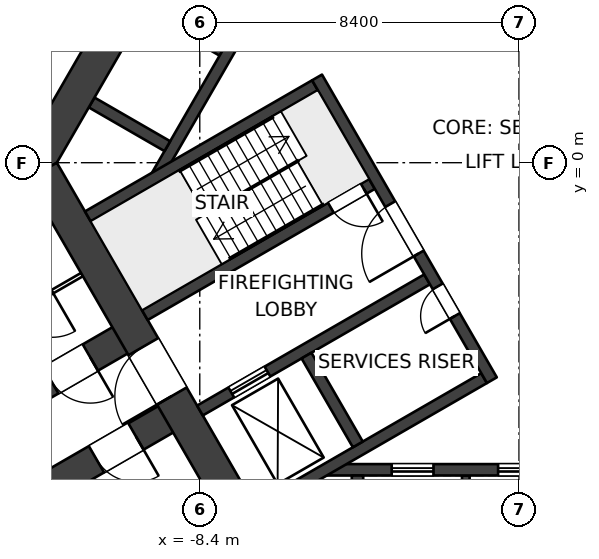
"""IFC4 building model, lengths in metres.
Left out: names, types, materials, properties, quantities, classifications, styles, units other than length and angle.
Written with IfcOpenShell. Run it as: python <this file> out.ifc"""

import sys

from ifc_helpers import new_model, si_unit, direction, frame, frame_2d, origin, place, context, subcontext, project, spatial, polyline, rectangle, outline, extrude, element, fill, save


model = new_model("IFC4")
c1 = context("Model", 3, precision=1e-05, world=origin(), true_north=direction((0.0, 1.0)))
c2 = subcontext(c1, "Body", "Model", "MODEL_VIEW")
j1 = project(units=[si_unit("LENGTHUNIT", "METRE"), si_unit("PLANEANGLEUNIT", "RADIAN")], contexts=[c1])
p1 = place(None, origin())
s1 = spatial("IfcSite", under=j1, at=p1, CompositionType="ELEMENT")
p2 = place(p1, origin())
s2 = spatial("IfcBuilding", under=s1, at=p2, CompositionType="ELEMENT")
p3 = place(p2, frame((0.0, 0.0, -3.5)))
s3 = spatial("IfcBuildingStorey", under=s2, at=p3, CompositionType="ELEMENT", Elevation=-3.5)
p4 = place(p3, frame((-6.47, -10.757, 0.0), z_axis=(0.0, 0.0, 1.0), x_axis=(-0.499997612506, 0.8660267822, 0.0)))
e1 = element("IfcWall", 1, at=p4, inside=s3, PredefinedType="SHEAR", context=c2, shape_type="SweptSolid", body=[
    extrude(rectangle(XDim=12.161, YDim=0.9, at=frame_2d((6.08, 0.0))), origin(), (0.0, 0.0, 1.0), 3.5),
])
p5 = place(p4, frame((5.33, 0.0, 0.0)))
e2 = element("IfcOpeningElement", 2, at=p5, cuts=e1, PredefinedType="OPENING", context=c2, shape_type="SweptSolid", body=[
    extrude(rectangle(XDim=1.5, YDim=2.1, at=frame_2d((0.75, 1.05))), frame((0.0, 0.46, 0.0), z_axis=(0.0, -1.0, 0.0), x_axis=(1.0, 0.0, 0.0)), (0.0, 0.0, 1.0), 0.92),
])
p6 = place(p3, origin())
e3 = element("IfcWall", 3, at=p6, inside=s3, PredefinedType="SHEAR", context=c2, shape_type="SweptSolid", body=[
    extrude(outline(polyline([(-6.6, 11.432), (-13.2, 0.0), (-12.94, -0.45), (-12.161, 0.0), (-6.08, 10.531), (-6.08, 11.432), (-6.6, 11.432)])), origin(), (0.0, 0.0, 1.0), 3.5),
])
p7 = place(p3, frame((-0.714, -5.724, 0.0), z_axis=(0.0, 0.0, 1.0), x_axis=(-0.499995050369, 0.866028261437, 0.0)))
e4 = element("IfcWall", 4, at=p7, inside=s3, PredefinedType="SHEAR", context=c2, shape_type="SweptSolid", body=[
    extrude(rectangle(XDim=9.2, YDim=0.3, at=frame_2d((4.6, 0.0))), origin(), (0.0, 0.0, 1.0), 3.5),
])
p8 = place(p7, frame((3.85, 0.0, 0.0)))
e5 = element("IfcOpeningElement", 5, at=p8, cuts=e4, PredefinedType="OPENING", context=c2, shape_type="SweptSolid", body=[
    extrude(rectangle(XDim=1.5, YDim=2.1, at=frame_2d((0.75, 1.05))), frame((0.0, 0.16, 0.0), z_axis=(0.0, -1.0, 0.0), x_axis=(1.0, 0.0, 0.0)), (0.0, 0.0, 1.0), 0.32),
])
p9 = place(p7, frame((1.95, 0.0, 0.0)))
e6 = element("IfcOpeningElement", 6, at=p9, cuts=e4, PredefinedType="OPENING", context=c2, shape_type="SweptSolid", body=[
    extrude(rectangle(XDim=0.9, YDim=2.1, at=frame_2d((0.45, 1.05))), frame((0.0, 0.16, 0.0), z_axis=(0.0, -1.0, 0.0), x_axis=(1.0, 0.0, 0.0)), (0.0, 0.0, 1.0), 0.32),
])
p10 = place(p3, frame((-3.869, -0.559, 0.0), z_axis=(0.0, 0.0, 1.0), x_axis=(-0.86602711848, -0.499997030048, 0.0)))
e7 = element("IfcWall", 7, at=p10, inside=s3, PredefinedType="SHEAR", context=c2, shape_type="SweptSolid", body=[
    extrude(rectangle(XDim=6.901, YDim=0.3, at=frame_2d((3.451, 0.0))), origin(), (0.0, 0.0, 1.0), 3.5),
])
p11 = place(p10, frame((0.25, 0.0, 0.0)))
e8 = element("IfcOpeningElement", 8, at=p11, cuts=e7, PredefinedType="OPENING", context=c2, shape_type="SweptSolid", body=[
    extrude(rectangle(XDim=1.0, YDim=2.1, at=frame_2d((0.5, 1.05))), frame((0.0, 0.16, 0.0), z_axis=(0.0, -1.0, 0.0), x_axis=(1.0, 0.0, 0.0)), (0.0, 0.0, 1.0), 0.32),
])
p12 = place(p3, frame((-5.369, 2.039, 0.0), z_axis=(0.0, 0.0, 1.0), x_axis=(-0.86602711848, -0.499997030048, 0.0)))
e9 = element("IfcWall", 9, at=p12, inside=s3, PredefinedType="SHEAR", context=c2, shape_type="SweptSolid", body=[
    extrude(rectangle(XDim=6.901, YDim=0.3, at=frame_2d((3.451, 0.0))), origin(), (0.0, 0.0, 1.0), 3.5),
])
p13 = place(p3, frame((-2.419, -3.071, 0.0), z_axis=(0.0, 0.0, 1.0), x_axis=(-0.86602711848, -0.499997030048, 0.0)))
e10 = element("IfcWall", 10, at=p13, inside=s3, PredefinedType="SHEAR", context=c2, shape_type="SweptSolid", body=[
    extrude(rectangle(XDim=6.901, YDim=0.3, at=frame_2d((3.451, 0.0))), origin(), (0.0, 0.0, 1.0), 3.5),
])
p14 = place(p13, frame((4.85, 0.0, 0.0)))
e11 = element("IfcOpeningElement", 11, at=p14, cuts=e10, PredefinedType="OPENING", context=c2, shape_type="SweptSolid", body=[
    extrude(rectangle(XDim=1.1, YDim=2.1, at=frame_2d((0.55, 1.05))), frame((0.0, 0.16, 0.0), z_axis=(0.0, -1.0, 0.0), x_axis=(1.0, 0.0, 0.0)), (0.0, 0.0, 1.0), 0.32),
])
p15 = place(p3, frame((-0.919, -5.669, 0.0), z_axis=(0.0, 0.0, 1.0), x_axis=(-0.866011800373, -0.500023561059, 0.0)))
e12 = element("IfcWall", 12, at=p15, inside=s3, PredefinedType="SHEAR", context=c2, shape_type="SweptSolid", body=[
    extrude(rectangle(XDim=6.902, YDim=0.3, at=frame_2d((3.451, 0.0))), origin(), (0.0, 0.0, 1.0), 3.5),
])
p16 = place(p3, frame((-4.241, -7.414, 0.0), z_axis=(0.0, 0.0, 1.0), x_axis=(-0.500048589285, 0.86599734893, 0.0)))
e13 = element("IfcWall", 13, at=p16, inside=s3, PredefinedType="SHEAR", context=c2, shape_type="SweptSolid", body=[
    extrude(rectangle(XDim=2.7, YDim=0.3, at=frame_2d((1.35, 0.0))), origin(), (0.0, 0.0, 1.0), 3.5),
])
p17 = place(p3, frame((5.098, -8.082, 0.0), z_axis=(0.0, 0.0, 1.0), x_axis=(-1.0, 0.0, 0.0)))
e14 = element("IfcWall", 14, at=p17, inside=s3, PredefinedType="SHEAR", context=c2, shape_type="SweptSolid", body=[
    extrude(rectangle(XDim=10.195, YDim=0.3, at=frame_2d((5.098, 0.0))), origin(), (0.0, 0.0, 1.0), 3.5),
])
p18 = place(p17, frame((1.748, 0.0, 0.0)))
e15 = element("IfcOpeningElement", 15, at=p18, cuts=e14, PredefinedType="OPENING", context=c2, shape_type="SweptSolid", body=[
    extrude(rectangle(XDim=1.1, YDim=2.1, at=frame_2d((0.55, 1.05))), frame((0.0, 0.16, 0.0), z_axis=(0.0, -1.0, 0.0), x_axis=(1.0, 0.0, 0.0)), (0.0, 0.0, 1.0), 0.32),
])
p19 = place(p17, frame((4.548, 0.0, 0.0)))
e16 = element("IfcOpeningElement", 16, at=p19, cuts=e14, PredefinedType="OPENING", context=c2, shape_type="SweptSolid", body=[
    extrude(rectangle(XDim=1.1, YDim=2.1, at=frame_2d((0.55, 1.05))), frame((0.0, 0.16, 0.0), z_axis=(0.0, -1.0, 0.0), x_axis=(1.0, 0.0, 0.0)), (0.0, 0.0, 1.0), 0.32),
])
p20 = place(p17, frame((7.348, 0.0, 0.0)))
e17 = element("IfcOpeningElement", 17, at=p20, cuts=e14, PredefinedType="OPENING", context=c2, shape_type="SweptSolid", body=[
    extrude(rectangle(XDim=1.1, YDim=2.1, at=frame_2d((0.55, 1.05))), frame((0.0, 0.16, 0.0), z_axis=(0.0, -1.0, 0.0), x_axis=(1.0, 0.0, 0.0)), (0.0, 0.0, 1.0), 0.32),
])
p21 = place(p3, frame((-4.25, -8.231, 0.0), z_axis=(0.0, 0.0, 1.0), x_axis=(0.0, -1.0, 0.0)))
e18 = element("IfcWall", 18, at=p21, inside=s3, PredefinedType="SHEAR", context=c2, shape_type="SweptSolid", body=[
    extrude(rectangle(XDim=2.3, YDim=0.3, at=frame_2d((1.15, 0.0))), origin(), (0.0, 0.0, 1.0), 3.5),
])
p22 = place(p3, frame((-1.4, -8.231, 0.0), z_axis=(0.0, 0.0, 1.0), x_axis=(0.0, -1.0, 0.0)))
e19 = element("IfcWall", 19, at=p22, inside=s3, PredefinedType="SHEAR", context=c2, shape_type="SweptSolid", body=[
    extrude(rectangle(XDim=2.3, YDim=0.2, at=frame_2d((1.15, 0.0))), origin(), (0.0, 0.0, 1.0), 3.5),
])
p23 = place(p3, frame((-9.548, -0.374, 0.0), z_axis=(0.0, 0.0, 1.0), x_axis=(0.500002290144, 0.866024081565, 0.0)))
e20 = element("IfcWall", 20, at=p23, inside=s3, PredefinedType="SHEAR", context=c2, shape_type="SweptSolid", body=[
    extrude(rectangle(XDim=10.195, YDim=0.3, at=frame_2d((5.098, 0.0))), origin(), (0.0, 0.0, 1.0), 3.5),
])
p24 = place(p3, frame((-9.254, 0.435, 0.0), z_axis=(0.0, 0.0, 1.0), x_axis=(-0.866007057882, 0.500031774688, 0.0)))
e21 = element("IfcWall", 21, at=p24, inside=s3, PredefinedType="SHEAR", context=c2, shape_type="SweptSolid", body=[
    extrude(rectangle(XDim=2.3, YDim=0.3, at=frame_2d((1.15, 0.0))), origin(), (0.0, 0.0, 1.0), 3.5),
])
p25 = place(p3, frame((-7.829, 2.903, 0.0), z_axis=(0.0, 0.0, 1.0), x_axis=(-0.866053019151, 0.499952165731, 0.0)))
e22 = element("IfcWall", 22, at=p25, inside=s3, PredefinedType="SHEAR", context=c2, shape_type="SweptSolid", body=[
    extrude(rectangle(XDim=2.3, YDim=0.2, at=frame_2d((1.15, 0.0))), origin(), (0.0, 0.0, 1.0), 3.5),
])
p26 = place(p3, frame((-8.91, -6.53, 0.0), z_axis=(0.0, 0.0, 1.0), x_axis=(-0.866025284237, -0.500000207062, 0.0)))
e23 = element("IfcWall", 23, at=p26, inside=s3, PredefinedType="SHEAR", context=c2, shape_type="SweptSolid", body=[
    extrude(rectangle(XDim=36.75, YDim=0.8, at=frame_2d((18.375, 0.0))), origin(), (0.0, 0.0, 1.0), 3.5),
])
p27 = place(p26, frame((1.35, 0.0, 0.0)))
e24 = element("IfcOpeningElement", 24, at=p27, cuts=e23, PredefinedType="OPENING", context=c2, shape_type="SweptSolid", body=[
    extrude(rectangle(XDim=1.2, YDim=2.1, at=frame_2d((0.6, 1.05))), frame((0.0, 0.41, 0.0), z_axis=(0.0, -1.0, 0.0), x_axis=(1.0, 0.0, 0.0)), (0.0, 0.0, 1.0), 0.82),
])
p28 = place(p3, frame((-10.11, -4.451, 0.0), z_axis=(0.0, 0.0, 1.0), x_axis=(-0.866025284237, -0.500000207062, 0.0)))
e25 = element("IfcWall", 25, at=p28, inside=s3, PredefinedType="SHEAR", context=c2, shape_type="SweptSolid", body=[
    extrude(rectangle(XDim=36.75, YDim=0.8, at=frame_2d((18.375, 0.0))), origin(), (0.0, 0.0, 1.0), 3.5),
])
p29 = place(p28, frame((1.35, 0.0, 0.0)))
e26 = element("IfcOpeningElement", 26, at=p29, cuts=e25, PredefinedType="OPENING", context=c2, shape_type="SweptSolid", body=[
    extrude(rectangle(XDim=1.2, YDim=2.1, at=frame_2d((0.6, 1.05))), frame((0.0, 0.41, 0.0), z_axis=(0.0, -1.0, 0.0), x_axis=(1.0, 0.0, 0.0)), (0.0, 0.0, 1.0), 0.82),
])
p30 = place(p3, frame((-11.5, -2.945, 0.0), z_axis=(0.0, 0.0, 1.0), x_axis=(-0.866034573852, -0.49998411664, 0.0)))
e27 = element("IfcWall", 27, at=p30, inside=s3, PredefinedType="PARTITIONING", context=c2, shape_type="SweptSolid", body=[
    extrude(rectangle(XDim=2.8, YDim=0.1, at=frame_2d((1.4, 0.0))), origin(), (0.0, 0.0, 1.0), 3.15),
])
p31 = place(p30, frame((0.9, 0.0, 0.0)))
e28 = element("IfcOpeningElement", 28, at=p31, cuts=e27, PredefinedType="OPENING", context=c2, shape_type="SweptSolid", body=[
    extrude(rectangle(XDim=1.2, YDim=2.1, at=frame_2d((0.6, 1.05))), frame((0.0, 0.06, 0.0), z_axis=(0.0, -1.0, 0.0), x_axis=(1.0, 0.0, 0.0)), (0.0, 0.0, 1.0), 0.12),
])
p32 = place(p3, frame((-9.45, 6.495, 0.0), z_axis=(0.0, 0.0, 1.0), x_axis=(-0.866025301493, -0.500000177174, 0.0)))
e29 = element("IfcWall", 29, at=p32, inside=s3, PredefinedType="SOLIDWALL", context=c2, shape_type="SweptSolid", body=[
    extrude(rectangle(XDim=43.095, YDim=0.3, at=frame_2d((21.548, 0.0))), origin(), (0.0, 0.0, 1.0), 3.15),
])
p33 = place(p32, frame((26.595, 0.0, 0.0)))
e30 = element("IfcOpeningElement", 30, at=p33, cuts=e29, PredefinedType="OPENING", context=c2, shape_type="SweptSolid", body=[
    extrude(rectangle(XDim=1.8, YDim=2.4, at=frame_2d((0.9, 1.2))), frame((0.0, 0.16, 0.0), z_axis=(0.0, -1.0, 0.0), x_axis=(1.0, 0.0, 0.0)), (0.0, 0.0, 1.0), 0.32),
])
p34 = place(p19, origin())
e31 = element("IfcDoor", 31, at=p34, inside=s3, OperationType="DOUBLE_DOOR_SLIDING", PredefinedType="DOOR", context=c2, shape_type="SweptSolid", body=[
    extrude(rectangle(XDim=1.1, YDim=2.1, at=frame_2d((0.55, 1.05))), frame((0.0, 0.025, 0.0), z_axis=(0.0, -1.0, 0.0), x_axis=(1.0, 0.0, 0.0)), (0.0, 0.0, 1.0), 0.05),
])
fill(e16, e31)
p35 = place(p20, origin())
e32 = element("IfcDoor", 32, at=p35, inside=s3, OperationType="DOUBLE_DOOR_SLIDING", PredefinedType="DOOR", context=c2, shape_type="SweptSolid", body=[
    extrude(rectangle(XDim=1.1, YDim=2.1, at=frame_2d((0.55, 1.05))), frame((0.0, 0.025, 0.0), z_axis=(0.0, -1.0, 0.0), x_axis=(1.0, 0.0, 0.0)), (0.0, 0.0, 1.0), 0.05),
])
fill(e17, e32)
p36 = place(p14, origin())
e33 = element("IfcDoor", 33, at=p36, inside=s3, OperationType="DOUBLE_DOOR_SLIDING", PredefinedType="DOOR", context=c2, shape_type="SweptSolid", body=[
    extrude(rectangle(XDim=1.1, YDim=2.1, at=frame_2d((0.55, 1.05))), frame((0.0, 0.025, 0.0), z_axis=(0.0, -1.0, 0.0), x_axis=(1.0, 0.0, 0.0)), (0.0, 0.0, 1.0), 0.05),
])
fill(e11, e33)
p37 = place(p8, origin())
e34 = element("IfcDoor", 34, at=p37, inside=s3, OperationType="DOUBLE_DOOR_DOUBLE_SWING", PredefinedType="DOOR", context=c2, shape_type="SweptSolid", body=[
    extrude(rectangle(XDim=1.5, YDim=2.1, at=frame_2d((0.75, 1.05))), frame((0.0, 0.025, 0.0), z_axis=(0.0, -1.0, 0.0), x_axis=(1.0, 0.0, 0.0)), (0.0, 0.0, 1.0), 0.05),
])
fill(e5, e34)
p38 = place(p9, origin())
e35 = element("IfcDoor", 35, at=p38, inside=s3, OperationType="SINGLE_SWING_LEFT", PredefinedType="DOOR", context=c2, shape_type="SweptSolid", body=[
    extrude(rectangle(XDim=0.9, YDim=2.1, at=frame_2d((0.45, 1.05))), frame((0.0, 0.025, 0.0), z_axis=(0.0, -1.0, 0.0), x_axis=(1.0, 0.0, 0.0)), (0.0, 0.0, 1.0), 0.05),
])
fill(e6, e35)
p39 = place(p11, origin())
e36 = element("IfcDoor", 36, at=p39, inside=s3, OperationType="SINGLE_SWING_LEFT", PredefinedType="DOOR", context=c2, shape_type="SweptSolid", body=[
    extrude(rectangle(XDim=1.0, YDim=2.1, at=frame_2d((0.5, 1.05))), frame((0.0, 0.025, 0.0), z_axis=(0.0, -1.0, 0.0), x_axis=(1.0, 0.0, 0.0)), (0.0, 0.0, 1.0), 0.05),
])
fill(e8, e36)
p40 = place(p5, origin())
e37 = element("IfcDoor", 37, at=p40, inside=s3, OperationType="DOUBLE_DOOR_DOUBLE_SWING", PredefinedType="DOOR", context=c2, shape_type="SweptSolid", body=[
    extrude(rectangle(XDim=1.5, YDim=2.1, at=frame_2d((0.75, 1.05))), frame((0.0, 0.025, 0.0), z_axis=(0.0, -1.0, 0.0), x_axis=(1.0, 0.0, 0.0)), (0.0, 0.0, 1.0), 0.05),
])
fill(e2, e37)
p41 = place(p27, origin())
e38 = element("IfcDoor", 38, at=p41, inside=s3, OperationType="DOUBLE_SWING_LEFT", PredefinedType="DOOR", context=c2, shape_type="SweptSolid", body=[
    extrude(rectangle(XDim=1.2, YDim=2.1, at=frame_2d((0.6, 1.05))), frame((0.0, 0.025, 0.0), z_axis=(0.0, -1.0, 0.0), x_axis=(1.0, 0.0, 0.0)), (0.0, 0.0, 1.0), 0.05),
])
fill(e24, e38)
p42 = place(p29, origin())
e39 = element("IfcDoor", 39, at=p42, inside=s3, OperationType="DOUBLE_SWING_LEFT", PredefinedType="DOOR", context=c2, shape_type="SweptSolid", body=[
    extrude(rectangle(XDim=1.2, YDim=2.1, at=frame_2d((0.6, 1.05))), frame((0.0, 0.025, 0.0), z_axis=(0.0, -1.0, 0.0), x_axis=(1.0, 0.0, 0.0)), (0.0, 0.0, 1.0), 0.05),
])
fill(e26, e39)
p43 = place(p31, origin())
e40 = element("IfcDoor", 40, at=p43, inside=s3, OperationType="DOUBLE_SWING_LEFT", PredefinedType="DOOR", context=c2, shape_type="SweptSolid", body=[
    extrude(rectangle(XDim=1.2, YDim=2.1, at=frame_2d((0.6, 1.05))), frame((0.0, 0.025, 0.0), z_axis=(0.0, -1.0, 0.0), x_axis=(1.0, 0.0, 0.0)), (0.0, 0.0, 1.0), 0.05),
])
fill(e28, e40)
save(model, sys.argv[1])
